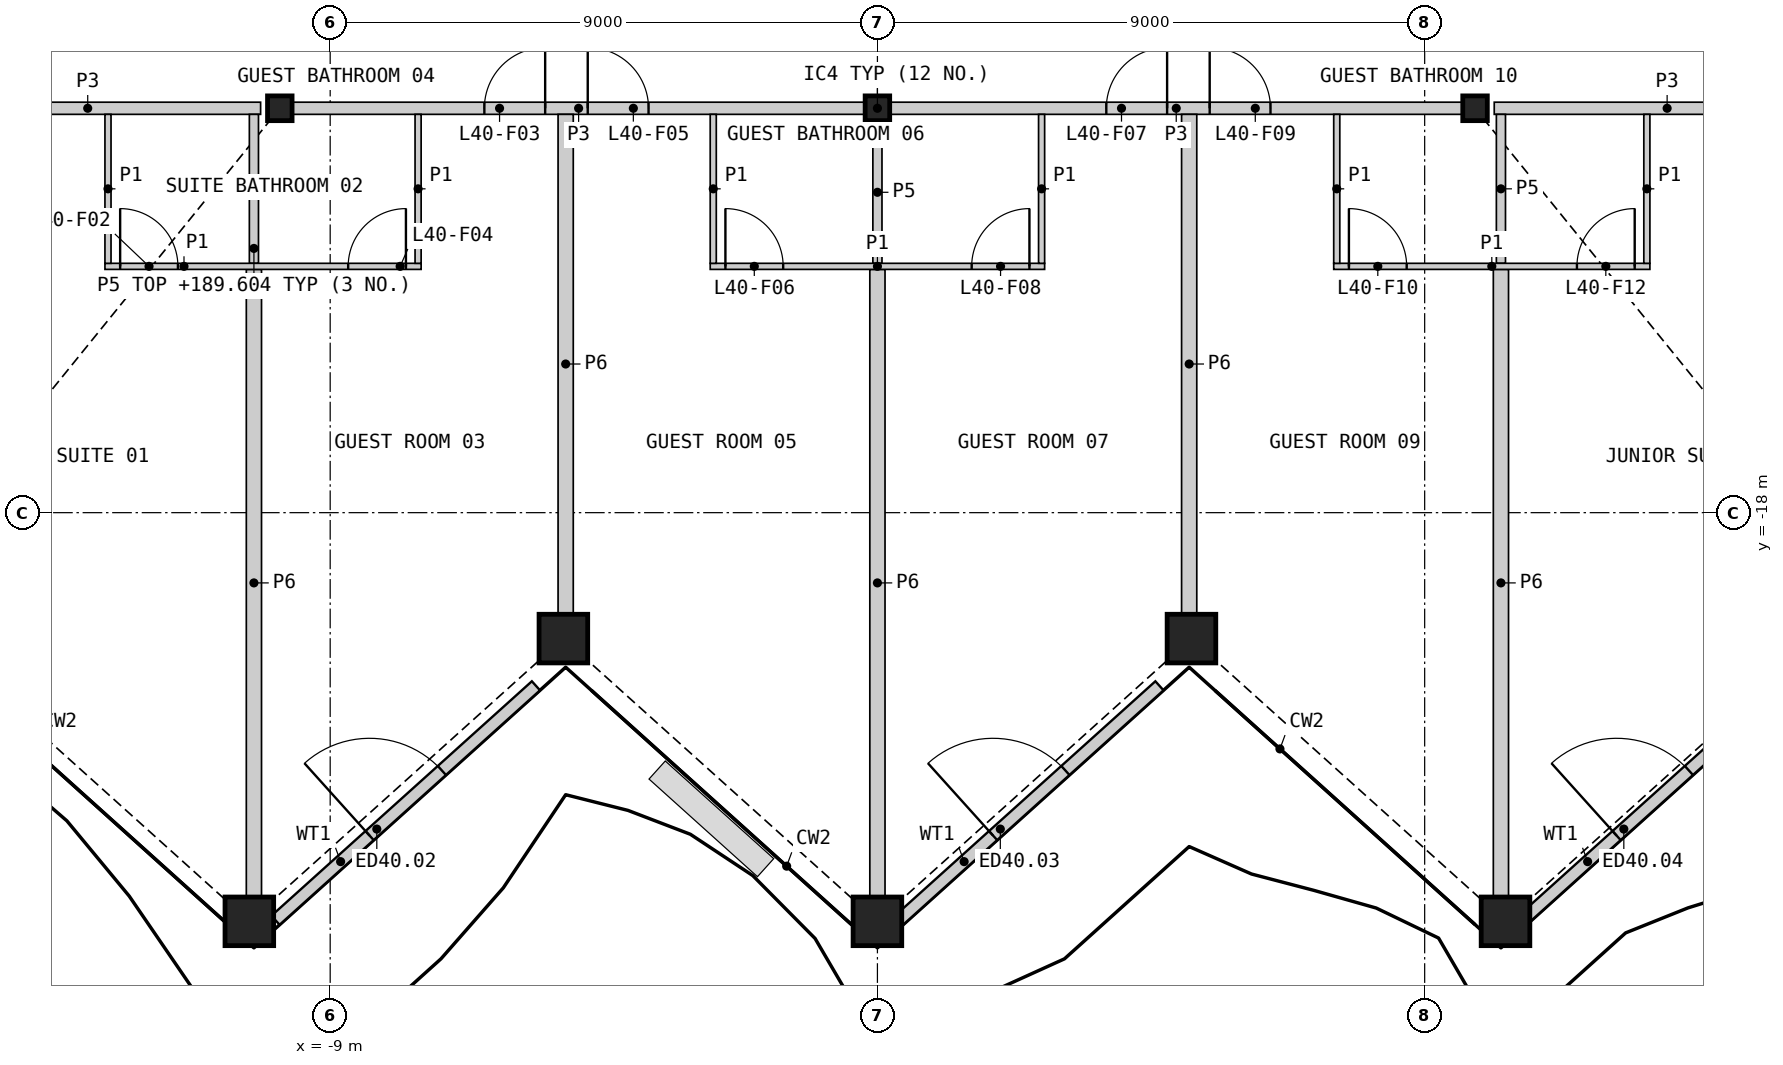
"""IFC4 building model, lengths in metres.
Left out: names, types, materials, properties, quantities, classifications, styles, units other than length and angle.
Written with IfcOpenShell. Run it as: python <this file> out.ifc"""

import sys

from ifc_helpers import new_model, si_unit, direction, frame, frame_2d, origin, origin_2d, place, context, subcontext, project, spatial, rectangle, hollow_rectangle, i_section, extrude, element, fill, save


model = new_model("IFC4")
c1 = context("Model", 3, precision=1e-05, world=origin(), true_north=direction((0.0, 1.0)))
c2 = subcontext(c1, "Body", "Model", "MODEL_VIEW")
j1 = project(units=[si_unit("LENGTHUNIT", "METRE"), si_unit("PLANEANGLEUNIT", "RADIAN")], contexts=[c1])
p1 = place(None, origin())
s1 = spatial("IfcSite", under=j1, at=p1, CompositionType="ELEMENT")
p2 = place(p1, origin())
s2 = spatial("IfcBuilding", under=s1, at=p2, CompositionType="ELEMENT")
p3 = place(p2, frame((0.0, 0.0, 187.2)))
s3 = spatial("IfcBuildingStorey", under=s2, at=p3, CompositionType="ELEMENT", Elevation=187.2)
for number, where, z_axis, x_axis in (
    (1, (-10.329, -24.722, 0.0), (0.0, 0.0, 1.0), (1.0, 0.0, 0.0)),
    (2, (-5.165, -20.071, 0.0), (0.0, 0.0, 1.0), (1.0, 0.0, 0.0)),
    (3, (0.0, -24.722, 0.0), (0.0, 0.0, 1.0), (1.0, 0.0, 0.0)),
    (4, (5.165, -20.071, 0.0), (0.0, 0.0, 1.0), (1.0, 0.0, 0.0)),
    (5, (10.329, -24.722, 0.0), (0.0, 0.0, 1.0), (1.0, 0.0, 0.0)),
):
    element("IfcColumn", number, at=place(p3, frame(where, z_axis=z_axis, x_axis=x_axis)), inside=s3, PredefinedType="COLUMN", context=c2, shape_type="SweptSolid", body=[
        extrude(hollow_rectangle(XDim=0.8, YDim=0.8, WallThickness=0.05, at=origin_2d()), origin(), (0.0, 0.0, 1.0), 3.6),
    ])
for number, where, z_axis, x_axis in (
    (6, (-9.828, -11.349, 0.0), (0.0, 0.0, 1.0), (1.0, 0.0, 0.0)),
    (7, (0.0, -11.349, 0.0), (0.0, 0.0, 1.0), (1.0, 0.0, 0.0)),
    (8, (9.828, -11.349, 0.0), (0.0, 0.0, 1.0), (1.0, 0.0, 0.0)),
):
    element("IfcColumn", number, at=place(p3, frame(where, z_axis=z_axis, x_axis=x_axis)), inside=s3, PredefinedType="COLUMN", context=c2, shape_type="SweptSolid", body=[
        extrude(i_section(OverallWidth=0.404, OverallDepth=0.407, WebThickness=0.027, FlangeThickness=0.044, at=origin_2d()), origin(), (0.0, 0.0, 1.0), 3.6),
    ])
p4 = place(p3, frame((-9.899, -24.704, 0.0), z_axis=(0.0, 0.0, 1.0), x_axis=(0.74312139518, 0.669156627424, 0.0)))
e9 = element("IfcWall", 9, at=p4, inside=s3, PredefinedType="SOLIDWALL", context=c2, shape_type="SweptSolid", body=[
    extrude(rectangle(XDim=5.763, YDim=0.2, at=frame_2d((2.882, 0.0))), origin(), (0.0, 0.0, 1.0), 2.701),
])
p5 = place(p4, frame((2.082, 0.0, 0.0)))
e10 = element("IfcOpeningElement", 10, at=p5, cuts=e9, PredefinedType="OPENING", context=c2, shape_type="SweptSolid", body=[
    extrude(rectangle(XDim=1.6, YDim=2.4, at=frame_2d((0.8, 1.2))), frame((0.0, 0.11, 0.0), z_axis=(0.0, -1.0, 0.0), x_axis=(1.0, 0.0, 0.0)), (0.0, 0.0, 1.0), 0.22),
])
p6 = place(p3, frame((0.355, -24.704, 0.0), z_axis=(0.0, 0.0, 1.0), x_axis=(0.743140362926, 0.669135562491, 0.0)))
e11 = element("IfcWall", 11, at=p6, inside=s3, PredefinedType="SOLIDWALL", context=c2, shape_type="SweptSolid", body=[
    extrude(rectangle(XDim=5.763, YDim=0.2, at=frame_2d((2.882, 0.0))), origin(), (0.0, 0.0, 1.0), 2.701),
])
p7 = place(p6, frame((2.082, 0.0, 0.0)))
e12 = element("IfcOpeningElement", 12, at=p7, cuts=e11, PredefinedType="OPENING", context=c2, shape_type="SweptSolid", body=[
    extrude(rectangle(XDim=1.6, YDim=2.4, at=frame_2d((0.8, 1.2))), frame((0.0, 0.11, 0.0), z_axis=(0.0, -1.0, 0.0), x_axis=(1.0, 0.0, 0.0)), (0.0, 0.0, 1.0), 0.22),
])
p8 = place(p3, frame((10.609, -24.704, 0.0), z_axis=(0.0, 0.0, 1.0), x_axis=(0.743140362926, 0.669135562491, 0.0)))
e13 = element("IfcWall", 13, at=p8, inside=s3, PredefinedType="SOLIDWALL", context=c2, shape_type="SweptSolid", body=[
    extrude(rectangle(XDim=5.763, YDim=0.2, at=frame_2d((2.882, 0.0))), origin(), (0.0, 0.0, 1.0), 2.701),
])
p9 = place(p8, frame((2.082, 0.0, 0.0)))
e14 = element("IfcOpeningElement", 14, at=p9, cuts=e13, PredefinedType="OPENING", context=c2, shape_type="SweptSolid", body=[
    extrude(rectangle(XDim=1.6, YDim=2.4, at=frame_2d((0.8, 1.2))), frame((0.0, 0.11, 0.0), z_axis=(0.0, -1.0, 0.0), x_axis=(1.0, 0.0, 0.0)), (0.0, 0.0, 1.0), 0.22),
])
for number, where, z_axis, x_axis in (
    (15, (-10.254, -24.312, 0.0), (0.0, 0.0, 1.0), (0.0, 1.0, 0.0)),
    (16, (0.0, -24.312, 0.0), (0.0, 0.0, 1.0), (0.0, 1.0, 0.0)),
    (17, (10.254, -24.312, 0.0), (0.0, 0.0, 1.0), (0.0, 1.0, 0.0)),
):
    element("IfcWall", number, at=place(p3, frame(where, z_axis=z_axis, x_axis=x_axis)), inside=s3, PredefinedType="PARTITIONING", context=c2, shape_type="SweptSolid", body=[
        extrude(rectangle(XDim=10.313, YDim=0.25, at=frame_2d((5.156, 0.0))), origin(), (0.0, 0.0, 1.0), 2.404),
    ])
p10 = place(p3, frame((-9.615, -11.349, 0.0), z_axis=(0.0, 0.0, 1.0), x_axis=(1.0, 0.0, 0.0)))
e18 = element("IfcWall", 18, at=p10, inside=s3, PredefinedType="PARTITIONING", context=c2, shape_type="SweptSolid", body=[
    extrude(rectangle(XDim=9.401, YDim=0.2, at=frame_2d((4.701, 0.0))), origin(), (0.0, 0.0, 1.0), 3.25),
])
p11 = place(p10, frame((3.15, 0.0, 0.0)))
e19 = element("IfcOpeningElement", 19, at=p11, cuts=e18, PredefinedType="OPENING", context=c2, shape_type="SweptSolid", body=[
    extrude(rectangle(XDim=1.0, YDim=2.1, at=frame_2d((0.5, 1.05))), frame((0.0, 0.11, 0.0), z_axis=(0.0, -1.0, 0.0), x_axis=(1.0, 0.0, 0.0)), (0.0, 0.0, 1.0), 0.22),
])
p12 = place(p10, frame((4.851, 0.0, 0.0)))
e20 = element("IfcOpeningElement", 20, at=p12, cuts=e18, PredefinedType="OPENING", context=c2, shape_type="SweptSolid", body=[
    extrude(rectangle(XDim=1.0, YDim=2.1, at=frame_2d((0.5, 1.05))), frame((0.0, 0.11, 0.0), z_axis=(0.0, -1.0, 0.0), x_axis=(1.0, 0.0, 0.0)), (0.0, 0.0, 1.0), 0.22),
])
p13 = place(p3, frame((0.214, -11.349, 0.0), z_axis=(0.0, 0.0, 1.0), x_axis=(1.0, 0.0, 0.0)))
e21 = element("IfcWall", 21, at=p13, inside=s3, PredefinedType="PARTITIONING", context=c2, shape_type="SweptSolid", body=[
    extrude(rectangle(XDim=9.401, YDim=0.2, at=frame_2d((4.701, 0.0))), origin(), (0.0, 0.0, 1.0), 3.25),
])
p14 = place(p13, frame((3.551, 0.0, 0.0)))
e22 = element("IfcOpeningElement", 22, at=p14, cuts=e21, PredefinedType="OPENING", context=c2, shape_type="SweptSolid", body=[
    extrude(rectangle(XDim=1.0, YDim=2.1, at=frame_2d((0.5, 1.05))), frame((0.0, 0.11, 0.0), z_axis=(0.0, -1.0, 0.0), x_axis=(1.0, 0.0, 0.0)), (0.0, 0.0, 1.0), 0.22),
])
p15 = place(p13, frame((5.251, 0.0, 0.0)))
e23 = element("IfcOpeningElement", 23, at=p15, cuts=e21, PredefinedType="OPENING", context=c2, shape_type="SweptSolid", body=[
    extrude(rectangle(XDim=1.0, YDim=2.1, at=frame_2d((0.5, 1.05))), frame((0.0, 0.11, 0.0), z_axis=(0.0, -1.0, 0.0), x_axis=(1.0, 0.0, 0.0)), (0.0, 0.0, 1.0), 0.22),
])
for number, where, z_axis, x_axis in (
    (24, (-5.127, -19.661, 0.0), (0.0, 0.0, 1.0), (0.0, 1.0, 0.0)),
    (25, (5.127, -19.661, 0.0), (0.0, 0.0, 1.0), (0.0, 1.0, 0.0)),
):
    element("IfcWall", number, at=place(p3, frame(where, z_axis=z_axis, x_axis=x_axis)), inside=s3, PredefinedType="PARTITIONING", context=c2, shape_type="SweptSolid", body=[
        extrude(rectangle(XDim=8.212, YDim=0.25, at=frame_2d((4.106, 0.0))), origin(), (0.0, 0.0, 1.0), 2.404),
    ])
p16 = place(p3, frame((-15.831, -11.349, 0.0), z_axis=(0.0, 0.0, 1.0), x_axis=(1.0, 0.0, 0.0)))
e26 = element("IfcWall", 26, at=p16, inside=s3, PredefinedType="PARTITIONING", context=c2, shape_type="SweptSolid", body=[
    extrude(rectangle(XDim=5.687, YDim=0.2, at=frame_2d((2.843, 0.0))), origin(), (0.0, 0.0, 1.0), 3.25),
])
p17 = place(p16, frame((0.352, 0.0, 0.0)))
e27 = element("IfcOpeningElement", 27, at=p17, cuts=e26, PredefinedType="OPENING", context=c2, shape_type="SweptSolid", body=[
    extrude(rectangle(XDim=1.1, YDim=2.1, at=frame_2d((0.55, 1.05))), frame((0.0, 0.11, 0.0), z_axis=(0.0, -1.0, 0.0), x_axis=(1.0, 0.0, 0.0)), (0.0, 0.0, 1.0), 0.22),
])
p18 = place(p3, frame((10.144, -11.349, 0.0), z_axis=(0.0, 0.0, 1.0), x_axis=(1.0, 0.0, 0.0)))
e28 = element("IfcWall", 28, at=p18, inside=s3, PredefinedType="PARTITIONING", context=c2, shape_type="SweptSolid", body=[
    extrude(rectangle(XDim=5.687, YDim=0.2, at=frame_2d((2.843, 0.0))), origin(), (0.0, 0.0, 1.0), 3.25),
])
p19 = place(p18, frame((4.235, 0.0, 0.0)))
e29 = element("IfcOpeningElement", 29, at=p19, cuts=e28, PredefinedType="OPENING", context=c2, shape_type="SweptSolid", body=[
    extrude(rectangle(XDim=1.1, YDim=2.1, at=frame_2d((0.55, 1.05))), frame((0.0, 0.11, 0.0), z_axis=(0.0, -1.0, 0.0), x_axis=(1.0, 0.0, 0.0)), (0.0, 0.0, 1.0), 0.22),
])
for number, where, z_axis, x_axis in (
    (30, (-10.254, -13.899, 0.0), (0.0, 0.0, 1.0), (0.0, 1.0, 0.0)),
    (31, (10.254, -13.899, 0.0), (0.0, 0.0, 1.0), (0.0, 1.0, 0.0)),
):
    element("IfcWall", number, at=place(p3, frame(where, z_axis=z_axis, x_axis=x_axis)), inside=s3, PredefinedType="PLUMBINGWALL", context=c2, shape_type="SweptSolid", body=[
        extrude(rectangle(XDim=2.45, YDim=0.15, at=frame_2d((1.225, 0.0))), origin(), (0.0, 0.0, 1.0), 2.404),
    ])
p20 = place(p3, frame((0.0, -13.899, 0.0), z_axis=(0.0, 0.0, 1.0), x_axis=(0.0, 1.0, 0.0)))
e32 = element("IfcWall", 32, at=p20, inside=s3, PredefinedType="PLUMBINGWALL", context=c2, shape_type="SweptSolid", body=[
    extrude(rectangle(XDim=2.336, YDim=0.15, at=frame_2d((1.168, 0.0))), origin(), (0.0, 0.0, 1.0), 2.404),
])
p21 = place(p3, frame((-2.75, -13.949, 0.0), z_axis=(0.0, 0.0, 1.0), x_axis=(1.0, 0.0, 0.0)))
e33 = element("IfcWall", 33, at=p21, inside=s3, PredefinedType="PARTITIONING", context=c2, shape_type="SweptSolid", body=[
    extrude(rectangle(XDim=5.5, YDim=0.1, at=frame_2d((2.75, 0.0))), origin(), (0.0, 0.0, 1.0), 2.404),
])
p22 = place(p21, frame((0.25, 0.0, 0.0)))
e34 = element("IfcOpeningElement", 34, at=p22, cuts=e33, PredefinedType="OPENING", context=c2, shape_type="SweptSolid", body=[
    extrude(rectangle(XDim=0.95, YDim=2.1, at=frame_2d((0.475, 1.05))), frame((0.0, 0.06, 0.0), z_axis=(0.0, -1.0, 0.0), x_axis=(1.0, 0.0, 0.0)), (0.0, 0.0, 1.0), 0.12),
])
p23 = place(p21, frame((4.3, 0.0, 0.0)))
e35 = element("IfcOpeningElement", 35, at=p23, cuts=e33, PredefinedType="OPENING", context=c2, shape_type="SweptSolid", body=[
    extrude(rectangle(XDim=0.95, YDim=2.1, at=frame_2d((0.475, 1.05))), frame((0.0, 0.06, 0.0), z_axis=(0.0, -1.0, 0.0), x_axis=(1.0, 0.0, 0.0)), (0.0, 0.0, 1.0), 0.12),
])
p24 = place(p3, frame((-12.704, -13.949, 0.0), z_axis=(0.0, 0.0, 1.0), x_axis=(1.0, 0.0, 0.0)))
e36 = element("IfcWall", 36, at=p24, inside=s3, PredefinedType="PARTITIONING", context=c2, shape_type="SweptSolid", body=[
    extrude(rectangle(XDim=5.2, YDim=0.1, at=frame_2d((2.6, 0.0))), origin(), (0.0, 0.0, 1.0), 2.404),
])
p25 = place(p24, frame((0.25, 0.0, 0.0)))
e37 = element("IfcOpeningElement", 37, at=p25, cuts=e36, PredefinedType="OPENING", context=c2, shape_type="SweptSolid", body=[
    extrude(rectangle(XDim=0.95, YDim=2.1, at=frame_2d((0.475, 1.05))), frame((0.0, 0.06, 0.0), z_axis=(0.0, -1.0, 0.0), x_axis=(1.0, 0.0, 0.0)), (0.0, 0.0, 1.0), 0.12),
])
p26 = place(p24, frame((4.0, 0.0, 0.0)))
e38 = element("IfcOpeningElement", 38, at=p26, cuts=e36, PredefinedType="OPENING", context=c2, shape_type="SweptSolid", body=[
    extrude(rectangle(XDim=0.95, YDim=2.1, at=frame_2d((0.475, 1.05))), frame((0.0, 0.06, 0.0), z_axis=(0.0, -1.0, 0.0), x_axis=(1.0, 0.0, 0.0)), (0.0, 0.0, 1.0), 0.12),
])
p27 = place(p3, frame((7.504, -13.949, 0.0), z_axis=(0.0, 0.0, 1.0), x_axis=(1.0, 0.0, 0.0)))
e39 = element("IfcWall", 39, at=p27, inside=s3, PredefinedType="PARTITIONING", context=c2, shape_type="SweptSolid", body=[
    extrude(rectangle(XDim=5.2, YDim=0.1, at=frame_2d((2.6, 0.0))), origin(), (0.0, 0.0, 1.0), 2.404),
])
p28 = place(p27, frame((0.25, 0.0, 0.0)))
e40 = element("IfcOpeningElement", 40, at=p28, cuts=e39, PredefinedType="OPENING", context=c2, shape_type="SweptSolid", body=[
    extrude(rectangle(XDim=0.95, YDim=2.1, at=frame_2d((0.475, 1.05))), frame((0.0, 0.06, 0.0), z_axis=(0.0, -1.0, 0.0), x_axis=(1.0, 0.0, 0.0)), (0.0, 0.0, 1.0), 0.12),
])
p29 = place(p27, frame((4.0, 0.0, 0.0)))
e41 = element("IfcOpeningElement", 41, at=p29, cuts=e39, PredefinedType="OPENING", context=c2, shape_type="SweptSolid", body=[
    extrude(rectangle(XDim=0.95, YDim=2.1, at=frame_2d((0.475, 1.05))), frame((0.0, 0.06, 0.0), z_axis=(0.0, -1.0, 0.0), x_axis=(1.0, 0.0, 0.0)), (0.0, 0.0, 1.0), 0.12),
])
for number, where, z_axis, x_axis in (
    (42, (-12.654, -13.899, 0.0), (0.0, 0.0, 1.0), (0.0, 1.0, 0.0)),
    (43, (-7.554, -13.899, 0.0), (0.0, 0.0, 1.0), (0.0, 1.0, 0.0)),
    (44, (-2.7, -13.899, 0.0), (0.0, 0.0, 1.0), (0.0, 1.0, 0.0)),
    (45, (2.7, -13.899, 0.0), (0.0, 0.0, 1.0), (0.0, 1.0, 0.0)),
    (46, (7.554, -13.899, 0.0), (0.0, 0.0, 1.0), (0.0, 1.0, 0.0)),
    (47, (12.654, -13.899, 0.0), (0.0, 0.0, 1.0), (0.0, 1.0, 0.0)),
):
    element("IfcWall", number, at=place(p3, frame(where, z_axis=z_axis, x_axis=x_axis)), inside=s3, PredefinedType="PARTITIONING", context=c2, shape_type="SweptSolid", body=[
        extrude(rectangle(XDim=2.45, YDim=0.1, at=frame_2d((1.225, 0.0))), origin(), (0.0, 0.0, 1.0), 2.404),
    ])
p30 = place(p5, origin())
e48 = element("IfcDoor", 48, at=p30, inside=s3, OperationType="DOUBLE_DOOR_SINGLE_SWING", PredefinedType="DOOR", context=c2, shape_type="SweptSolid", body=[
    extrude(rectangle(XDim=1.6, YDim=2.4, at=frame_2d((0.8, 1.2))), frame((0.0, 0.025, 0.0), z_axis=(0.0, -1.0, 0.0), x_axis=(1.0, 0.0, 0.0)), (0.0, 0.0, 1.0), 0.05),
])
fill(e10, e48)
p31 = place(p7, origin())
e49 = element("IfcDoor", 49, at=p31, inside=s3, OperationType="DOUBLE_DOOR_SINGLE_SWING", PredefinedType="DOOR", context=c2, shape_type="SweptSolid", body=[
    extrude(rectangle(XDim=1.6, YDim=2.4, at=frame_2d((0.8, 1.2))), frame((0.0, 0.025, 0.0), z_axis=(0.0, -1.0, 0.0), x_axis=(1.0, 0.0, 0.0)), (0.0, 0.0, 1.0), 0.05),
])
fill(e12, e49)
p32 = place(p9, origin())
e50 = element("IfcDoor", 50, at=p32, inside=s3, OperationType="DOUBLE_DOOR_SINGLE_SWING", PredefinedType="DOOR", context=c2, shape_type="SweptSolid", body=[
    extrude(rectangle(XDim=1.6, YDim=2.4, at=frame_2d((0.8, 1.2))), frame((0.0, 0.025, 0.0), z_axis=(0.0, -1.0, 0.0), x_axis=(1.0, 0.0, 0.0)), (0.0, 0.0, 1.0), 0.05),
])
fill(e14, e50)
p33 = place(p25, origin())
e51 = element("IfcDoor", 51, at=p33, inside=s3, OperationType="SINGLE_SWING_LEFT", PredefinedType="DOOR", context=c2, shape_type="SweptSolid", body=[
    extrude(rectangle(XDim=0.95, YDim=2.1, at=frame_2d((0.475, 1.05))), frame((0.0, 0.025, 0.0), z_axis=(0.0, -1.0, 0.0), x_axis=(1.0, 0.0, 0.0)), (0.0, 0.0, 1.0), 0.05),
])
fill(e37, e51)
p34 = place(p11, origin())
e52 = element("IfcDoor", 52, at=p34, inside=s3, OperationType="SINGLE_SWING_RIGHT", PredefinedType="DOOR", context=c2, shape_type="SweptSolid", body=[
    extrude(rectangle(XDim=1.0, YDim=2.1, at=frame_2d((0.5, 1.05))), frame((0.0, 0.025, 0.0), z_axis=(0.0, -1.0, 0.0), x_axis=(1.0, 0.0, 0.0)), (0.0, 0.0, 1.0), 0.05),
])
fill(e19, e52)
p35 = place(p26, origin())
e53 = element("IfcDoor", 53, at=p35, inside=s3, OperationType="SINGLE_SWING_RIGHT", PredefinedType="DOOR", context=c2, shape_type="SweptSolid", body=[
    extrude(rectangle(XDim=0.95, YDim=2.1, at=frame_2d((0.475, 1.05))), frame((0.0, 0.025, 0.0), z_axis=(0.0, -1.0, 0.0), x_axis=(1.0, 0.0, 0.0)), (0.0, 0.0, 1.0), 0.05),
])
fill(e38, e53)
p36 = place(p12, origin())
e54 = element("IfcDoor", 54, at=p36, inside=s3, OperationType="SINGLE_SWING_LEFT", PredefinedType="DOOR", context=c2, shape_type="SweptSolid", body=[
    extrude(rectangle(XDim=1.0, YDim=2.1, at=frame_2d((0.5, 1.05))), frame((0.0, 0.025, 0.0), z_axis=(0.0, -1.0, 0.0), x_axis=(1.0, 0.0, 0.0)), (0.0, 0.0, 1.0), 0.05),
])
fill(e20, e54)
p37 = place(p22, origin())
e55 = element("IfcDoor", 55, at=p37, inside=s3, OperationType="SINGLE_SWING_LEFT", PredefinedType="DOOR", context=c2, shape_type="SweptSolid", body=[
    extrude(rectangle(XDim=0.95, YDim=2.1, at=frame_2d((0.475, 1.05))), frame((0.0, 0.025, 0.0), z_axis=(0.0, -1.0, 0.0), x_axis=(1.0, 0.0, 0.0)), (0.0, 0.0, 1.0), 0.05),
])
fill(e34, e55)
p38 = place(p14, origin())
e56 = element("IfcDoor", 56, at=p38, inside=s3, OperationType="SINGLE_SWING_RIGHT", PredefinedType="DOOR", context=c2, shape_type="SweptSolid", body=[
    extrude(rectangle(XDim=1.0, YDim=2.1, at=frame_2d((0.5, 1.05))), frame((0.0, 0.025, 0.0), z_axis=(0.0, -1.0, 0.0), x_axis=(1.0, 0.0, 0.0)), (0.0, 0.0, 1.0), 0.05),
])
fill(e22, e56)
p39 = place(p23, origin())
e57 = element("IfcDoor", 57, at=p39, inside=s3, OperationType="SINGLE_SWING_RIGHT", PredefinedType="DOOR", context=c2, shape_type="SweptSolid", body=[
    extrude(rectangle(XDim=0.95, YDim=2.1, at=frame_2d((0.475, 1.05))), frame((0.0, 0.025, 0.0), z_axis=(0.0, -1.0, 0.0), x_axis=(1.0, 0.0, 0.0)), (0.0, 0.0, 1.0), 0.05),
])
fill(e35, e57)
p40 = place(p15, origin())
e58 = element("IfcDoor", 58, at=p40, inside=s3, OperationType="SINGLE_SWING_LEFT", PredefinedType="DOOR", context=c2, shape_type="SweptSolid", body=[
    extrude(rectangle(XDim=1.0, YDim=2.1, at=frame_2d((0.5, 1.05))), frame((0.0, 0.025, 0.0), z_axis=(0.0, -1.0, 0.0), x_axis=(1.0, 0.0, 0.0)), (0.0, 0.0, 1.0), 0.05),
])
fill(e23, e58)
p41 = place(p28, origin())
e59 = element("IfcDoor", 59, at=p41, inside=s3, OperationType="SINGLE_SWING_LEFT", PredefinedType="DOOR", context=c2, shape_type="SweptSolid", body=[
    extrude(rectangle(XDim=0.95, YDim=2.1, at=frame_2d((0.475, 1.05))), frame((0.0, 0.025, 0.0), z_axis=(0.0, -1.0, 0.0), x_axis=(1.0, 0.0, 0.0)), (0.0, 0.0, 1.0), 0.05),
])
fill(e40, e59)
p42 = place(p29, origin())
e60 = element("IfcDoor", 60, at=p42, inside=s3, OperationType="SINGLE_SWING_RIGHT", PredefinedType="DOOR", context=c2, shape_type="SweptSolid", body=[
    extrude(rectangle(XDim=0.95, YDim=2.1, at=frame_2d((0.475, 1.05))), frame((0.0, 0.025, 0.0), z_axis=(0.0, -1.0, 0.0), x_axis=(1.0, 0.0, 0.0)), (0.0, 0.0, 1.0), 0.05),
])
fill(e41, e60)
save(model, sys.argv[1])
